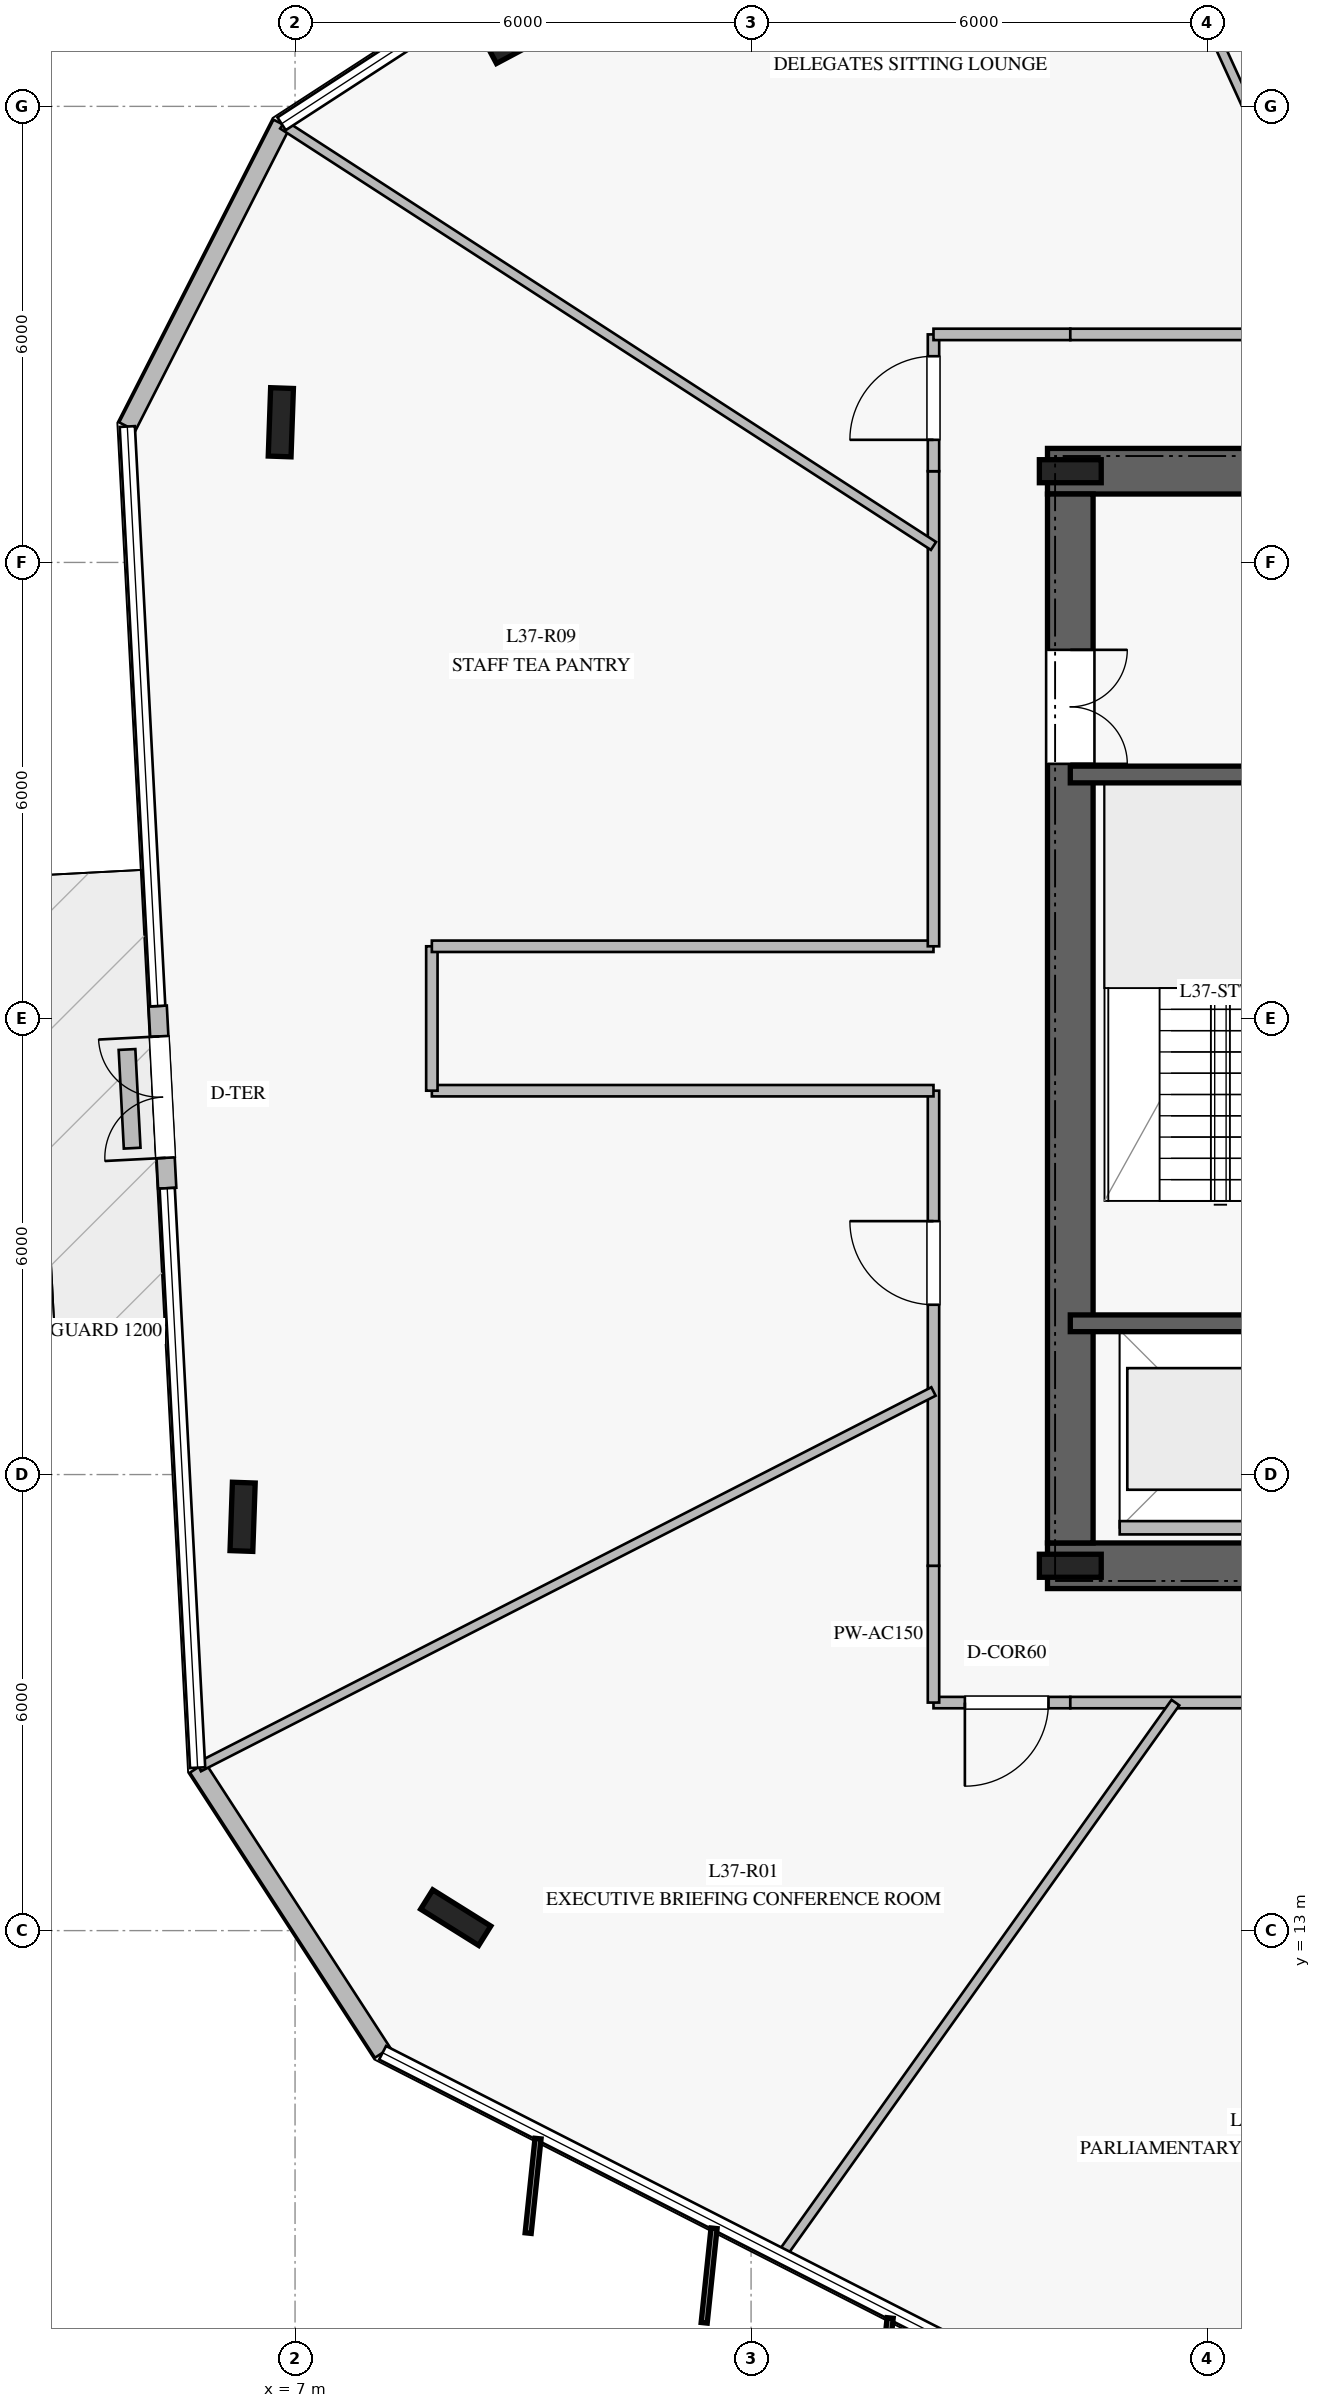
"""IFC4 building model, lengths in metres.
Left out: names, types, materials, properties, quantities, classifications, styles, units other than length and angle.
Written with IfcOpenShell. Run it as: python <this file> out.ifc"""

import sys

from ifc_helpers import new_model, si_unit, direction, frame, frame_2d, origin, origin_2d, place, context, subcontext, project, spatial, rectangle, i_section, extrude, element, fill, save


model = new_model("IFC4")
c1 = context("Model", 3, precision=1e-05, world=origin(), true_north=direction((0.0, 1.0)))
c2 = subcontext(c1, "Body", "Model", "MODEL_VIEW")
j1 = project(units=[si_unit("LENGTHUNIT", "METRE"), si_unit("PLANEANGLEUNIT", "RADIAN")], contexts=[c1])
p1 = place(None, origin())
s1 = spatial("IfcSite", under=j1, at=p1, CompositionType="ELEMENT")
p2 = place(p1, origin())
s2 = spatial("IfcBuilding", under=s1, at=p2, CompositionType="ELEMENT")
p3 = place(p2, frame((0.0, 0.0, 154.4)))
s3 = spatial("IfcBuildingStorey", under=s2, at=p3, CompositionType="ELEMENT", Elevation=154.4)
p4 = place(p3, frame((16.9, 17.8, 0.0), z_axis=(0.0, 0.0, 1.0), x_axis=(1.0, 0.0, 0.0)))
e1 = element("IfcWall", 1, at=p4, inside=s3, PredefinedType="SHEAR", context=c2, shape_type="SweptSolid", body=[
    extrude(rectangle(XDim=16.2, YDim=0.6, at=frame_2d((8.1, 0.0))), origin(), (0.0, 0.0, 1.0), 3.76),
])
p5 = place(p4, frame((5.05, 0.0, 0.0)))
e2 = element("IfcOpeningElement", 2, at=p5, cuts=e1, PredefinedType="OPENING", context=c2, shape_type="SweptSolid", body=[
    extrude(rectangle(XDim=1.2, YDim=2.25, at=frame_2d((0.6, 1.125))), frame((0.0, 0.31, 0.0), z_axis=(0.0, -1.0, 0.0), x_axis=(1.0, 0.0, 0.0)), (0.0, 0.0, 1.0), 0.62),
])
p6 = place(p4, frame((10.95, 0.0, 0.0)))
e3 = element("IfcOpeningElement", 3, at=p6, cuts=e1, PredefinedType="OPENING", context=c2, shape_type="SweptSolid", body=[
    extrude(rectangle(XDim=1.1, YDim=2.2, at=frame_2d((0.55, 1.1))), frame((0.0, 0.31, 0.0), z_axis=(0.0, -1.0, 0.0), x_axis=(1.0, 0.0, 0.0)), (0.0, 0.0, 1.0), 0.62),
])
p7 = place(p3, frame((33.1, 32.2, 0.0), z_axis=(0.0, 0.0, 1.0), x_axis=(-1.0, 0.0, 0.0)))
e4 = element("IfcWall", 4, at=p7, inside=s3, PredefinedType="SHEAR", context=c2, shape_type="SweptSolid", body=[
    extrude(rectangle(XDim=16.2, YDim=0.6, at=frame_2d((8.1, 0.0))), origin(), (0.0, 0.0, 1.0), 3.76),
])
p8 = place(p7, frame((5.05, 0.0, 0.0)))
e5 = element("IfcOpeningElement", 5, at=p8, cuts=e4, PredefinedType="OPENING", context=c2, shape_type="SweptSolid", body=[
    extrude(rectangle(XDim=1.2, YDim=2.25, at=frame_2d((0.6, 1.125))), frame((0.0, 0.31, 0.0), z_axis=(0.0, -1.0, 0.0), x_axis=(1.0, 0.0, 0.0)), (0.0, 0.0, 1.0), 0.62),
])
p9 = place(p7, frame((11.85, 0.0, 0.0)))
e6 = element("IfcOpeningElement", 6, at=p9, cuts=e4, PredefinedType="OPENING", context=c2, shape_type="SweptSolid", body=[
    extrude(rectangle(XDim=1.1, YDim=2.2, at=frame_2d((0.55, 1.1))), frame((0.0, 0.31, 0.0), z_axis=(0.0, -1.0, 0.0), x_axis=(1.0, 0.0, 0.0)), (0.0, 0.0, 1.0), 0.62),
])
p10 = place(p7, frame((9.875, 0.0, 0.0)))
e7 = element("IfcOpeningElement", 7, at=p10, cuts=e4, PredefinedType="OPENING", context=c2, shape_type="SweptSolid", body=[
    extrude(rectangle(XDim=1.1, YDim=2.2, at=frame_2d((0.55, 1.1))), frame((0.0, 0.31, 0.0), z_axis=(0.0, -1.0, 0.0), x_axis=(1.0, 0.0, 0.0)), (0.0, 0.0, 1.0), 0.62),
])
p11 = place(p7, frame((7.9, 0.0, 0.0)))
e8 = element("IfcOpeningElement", 8, at=p11, cuts=e4, PredefinedType="OPENING", context=c2, shape_type="SweptSolid", body=[
    extrude(rectangle(XDim=1.1, YDim=2.2, at=frame_2d((0.55, 1.1))), frame((0.0, 0.31, 0.0), z_axis=(0.0, -1.0, 0.0), x_axis=(1.0, 0.0, 0.0)), (0.0, 0.0, 1.0), 0.62),
])
p12 = place(p3, frame((17.2, 31.9, 0.0), z_axis=(0.0, 0.0, 1.0), x_axis=(0.0, -1.0, 0.0)))
e9 = element("IfcWall", 9, at=p12, inside=s3, PredefinedType="SHEAR", context=c2, shape_type="SweptSolid", body=[
    extrude(rectangle(XDim=13.8, YDim=0.6, at=frame_2d((6.9, 0.0))), origin(), (0.0, 0.0, 1.0), 3.76),
])
p13 = place(p12, frame((2.05, 0.0, 0.0)))
e10 = element("IfcOpeningElement", 10, at=p13, cuts=e9, PredefinedType="OPENING", context=c2, shape_type="SweptSolid", body=[
    extrude(rectangle(XDim=1.5, YDim=2.2, at=frame_2d((0.75, 1.1))), frame((0.0, 0.31, 0.0), z_axis=(0.0, -1.0, 0.0), x_axis=(1.0, 0.0, 0.0)), (0.0, 0.0, 1.0), 0.62),
])
for number, where, z_axis, x_axis in (
    (11, (17.2, 17.8, 0.0), (0.0, 0.0, 1.0), (1.0, 0.0, 0.0)),
    (12, (17.2, 32.2, 0.0), (0.0, 0.0, 1.0), (1.0, 0.0, 0.0)),
):
    element("IfcColumn", number, at=place(p3, frame(where, z_axis=z_axis, x_axis=x_axis)), inside=s3, PredefinedType="COLUMN", context=c2, shape_type="SweptSolid", body=[
        extrude(i_section(OverallWidth=0.303, OverallDepth=0.814, WebThickness=0.021, FlangeThickness=0.04, at=origin_2d()), origin(), (0.0, 0.0, 1.0), 4.0),
    ])
for number, where, z_axis, x_axis in (
    (13, (17.2, 20.99, 0.0), (0.0, 0.0, 1.0), (1.0, 0.0, 0.0)),
    (14, (17.2, 28.21, 0.0), (0.0, 0.0, 1.0), (1.0, 0.0, 0.0)),
):
    element("IfcWall", number, at=place(p3, frame(where, z_axis=z_axis, x_axis=x_axis)), inside=s3, PredefinedType="SOLIDWALL", context=c2, shape_type="SweptSolid", body=[
        extrude(rectangle(XDim=3.72, YDim=0.22, at=frame_2d((1.86, 0.0))), origin(), (0.0, 0.0, 1.0), 3.76),
    ])
for number, where, z_axis, x_axis in (
    (15, (9.977, 37.908, 0.0), (0.0, 0.0, 1.0), (0.883, 0.469, 0.0)),
    (16, (6.813, 32.844, 0.0), (0.0, 0.0, 1.0), (0.035, 0.999, 0.0)),
    (17, (6.31, 18.444, 0.0), (0.0, 0.0, 1.0), (0.035, 0.999, 0.0)),
    (18, (9.114, 13.171, 0.0), (0.0, 0.0, 1.0), (-0.848, 0.53, 0.0)),
):
    element("IfcColumn", number, at=place(p3, frame(where, z_axis=z_axis, x_axis=x_axis)), inside=s3, PredefinedType="COLUMN", context=c2, shape_type="SweptSolid", body=[
        extrude(i_section(OverallWidth=0.3, OverallDepth=0.9, WebThickness=0.019, FlangeThickness=0.035, at=origin_2d()), origin(), (0.0, 0.0, 1.0), 4.0),
    ])
p14 = place(p3, frame((6.823, 36.771, 0.0), z_axis=(0.0, 0.0, 1.0), x_axis=(-0.454103301767, -0.89094903969, 0.0)))
e19 = element("IfcWall", 19, at=p14, inside=s3, PredefinedType="STANDARD", context=c2, shape_type="SweptSolid", body=[
    extrude(rectangle(XDim=4.47, YDim=0.24, at=frame_2d((2.235, 0.0))), origin(), (0.0, 0.0, 1.0), 3.76),
])
p15 = place(p3, frame((5.193, 25.164, 0.0), z_axis=(0.0, 0.0, 1.0), x_axis=(0.052078347636, -0.998643002132, 0.0)))
e20 = element("IfcWall", 20, at=p15, inside=s3, PredefinedType="STANDARD", context=c2, shape_type="SweptSolid", body=[
    extrude(rectangle(XDim=2.4, YDim=0.24, at=frame_2d((1.2, 0.0))), origin(), (0.0, 0.0, 1.0), 3.76),
])
p16 = place(p15, frame((0.4, 0.0, 0.0)))
e21 = element("IfcOpeningElement", 21, at=p16, cuts=e20, PredefinedType="OPENING", context=c2, shape_type="SweptSolid", body=[
    extrude(rectangle(XDim=1.6, YDim=2.25, at=frame_2d((0.8, 1.125))), frame((0.0, 0.13, 0.0), z_axis=(0.0, -1.0, 0.0), x_axis=(1.0, 0.0, 0.0)), (0.0, 0.0, 1.0), 0.26),
])
p17 = place(p3, frame((5.718, 15.144, 0.0), z_axis=(0.0, 0.0, 1.0), x_axis=(0.544351046129, -0.838857519832, 0.0)))
e22 = element("IfcWall", 22, at=p17, inside=s3, PredefinedType="STANDARD", context=c2, shape_type="SweptSolid", body=[
    extrude(rectangle(XDim=4.471, YDim=0.24, at=frame_2d((2.236, 0.0))), origin(), (0.0, 0.0, 1.0), 3.76),
])
p18 = place(p3, frame((4.789, 24.592, 0.0), z_axis=(0.0, 0.0, 1.0), x_axis=(0.052213802573, -0.998635929066, 0.0)))
e23 = element("IfcWall", 23, at=p18, inside=s3, PredefinedType="USERDEFINED", context=c2, shape_type="SweptSolid", body=[
    extrude(rectangle(XDim=1.3, YDim=0.22, at=frame_2d((0.65, 0.0))), origin(), (0.0, 0.0, 1.0), 0.4),
])
p19 = place(p3, frame((17.85, 18.3, 0.0), z_axis=(0.0, 0.0, 1.0), x_axis=(1.0, 0.0, 0.0)))
e24 = element("IfcWall", 24, at=p19, inside=s3, PredefinedType="PARTITIONING", context=c2, shape_type="SweptSolid", body=[
    extrude(rectangle(XDim=2.6, YDim=0.175, at=frame_2d((1.3, 0.0))), origin(), (0.0, 0.0, 1.0), 3.76),
])
p20 = place(p3, frame((17.2, 16.0, 0.0), z_axis=(0.0, 0.0, 1.0), x_axis=(-1.0, 0.0, 0.0)))
e25 = element("IfcWall", 25, at=p20, inside=s3, PredefinedType="PARTITIONING", context=c2, shape_type="SweptSolid", body=[
    extrude(rectangle(XDim=1.8, YDim=0.15, at=frame_2d((0.9, 0.0))), origin(), (0.0, 0.0, 1.0), 3.36),
])
p21 = place(p20, frame((0.287, 0.0, 0.0)))
e26 = element("IfcOpeningElement", 26, at=p21, cuts=e25, PredefinedType="OPENING", context=c2, shape_type="SweptSolid", body=[
    extrude(rectangle(XDim=1.1, YDim=2.2, at=frame_2d((0.55, 1.1))), frame((0.0, 0.085, 0.0), z_axis=(0.0, -1.0, 0.0), x_axis=(1.0, 0.0, 0.0)), (0.0, 0.0, 1.0), 0.17),
])
p22 = place(p3, frame((15.4, 16.0, 0.0), z_axis=(0.0, 0.0, 1.0), x_axis=(0.0, 1.0, 0.0)))
e27 = element("IfcWall", 27, at=p22, inside=s3, PredefinedType="PARTITIONING", context=c2, shape_type="SweptSolid", body=[
    extrude(rectangle(XDim=1.8, YDim=0.15, at=frame_2d((0.9, 0.0))), origin(), (0.0, 0.0, 1.0), 3.21),
])
p23 = place(p3, frame((15.4, 17.8, 0.0), z_axis=(0.0, 0.0, 1.0), x_axis=(0.0, 1.0, 0.0)))
e28 = element("IfcWall", 28, at=p23, inside=s3, PredefinedType="PARTITIONING", context=c2, shape_type="SweptSolid", body=[
    extrude(rectangle(XDim=6.25, YDim=0.15, at=frame_2d((3.125, 0.0))), origin(), (0.0, 0.0, 1.0), 3.21),
])
p24 = place(p23, frame((3.434, 0.0, 0.0)))
e29 = element("IfcOpeningElement", 29, at=p24, cuts=e28, PredefinedType="OPENING", context=c2, shape_type="SweptSolid", body=[
    extrude(rectangle(XDim=1.1, YDim=2.2, at=frame_2d((0.55, 1.1))), frame((0.0, 0.085, 0.0), z_axis=(0.0, -1.0, 0.0), x_axis=(1.0, 0.0, 0.0)), (0.0, 0.0, 1.0), 0.17),
])
p25 = place(p3, frame((15.4, 24.05, 0.0), z_axis=(0.0, 0.0, 1.0), x_axis=(-1.0, 0.0, 0.0)))
e30 = element("IfcWall", 30, at=p25, inside=s3, PredefinedType="PARTITIONING", context=c2, shape_type="SweptSolid", body=[
    extrude(rectangle(XDim=6.6, YDim=0.15, at=frame_2d((3.3, 0.0))), origin(), (0.0, 0.0, 1.0), 3.02),
])
p26 = place(p3, frame((8.8, 24.05, 0.0), z_axis=(0.0, 0.0, 1.0), x_axis=(0.0, 1.0, 0.0)))
e31 = element("IfcWall", 31, at=p26, inside=s3, PredefinedType="PARTITIONING", context=c2, shape_type="SweptSolid", body=[
    extrude(rectangle(XDim=1.9, YDim=0.15, at=frame_2d((0.95, 0.0))), origin(), (0.0, 0.0, 1.0), 3.22),
])
p27 = place(p3, frame((8.8, 25.95, 0.0), z_axis=(0.0, 0.0, 1.0), x_axis=(1.0, 0.0, 0.0)))
e32 = element("IfcWall", 32, at=p27, inside=s3, PredefinedType="PARTITIONING", context=c2, shape_type="SweptSolid", body=[
    extrude(rectangle(XDim=6.6, YDim=0.15, at=frame_2d((3.3, 0.0))), origin(), (0.0, 0.0, 1.0), 3.02),
])
p28 = place(p3, frame((15.4, 25.95, 0.0), z_axis=(0.0, 0.0, 1.0), x_axis=(0.0, 1.0, 0.0)))
e33 = element("IfcWall", 33, at=p28, inside=s3, PredefinedType="PARTITIONING", context=c2, shape_type="SweptSolid", body=[
    extrude(rectangle(XDim=6.25, YDim=0.15, at=frame_2d((3.125, 0.0))), origin(), (0.0, 0.0, 1.0), 3.21),
])
p29 = place(p3, frame((15.4, 32.2, 0.0), z_axis=(0.0, 0.0, 1.0), x_axis=(0.0, 1.0, 0.0)))
e34 = element("IfcWall", 34, at=p29, inside=s3, PredefinedType="PARTITIONING", context=c2, shape_type="SweptSolid", body=[
    extrude(rectangle(XDim=1.8, YDim=0.15, at=frame_2d((0.9, 0.0))), origin(), (0.0, 0.0, 1.0), 3.21),
])
p30 = place(p29, frame((0.413, 0.0, 0.0)))
e35 = element("IfcOpeningElement", 35, at=p30, cuts=e34, PredefinedType="OPENING", context=c2, shape_type="SweptSolid", body=[
    extrude(rectangle(XDim=1.1, YDim=2.2, at=frame_2d((0.55, 1.1))), frame((0.0, 0.085, 0.0), z_axis=(0.0, -1.0, 0.0), x_axis=(1.0, 0.0, 0.0)), (0.0, 0.0, 1.0), 0.17),
])
p31 = place(p3, frame((15.4, 34.0, 0.0), z_axis=(0.0, 0.0, 1.0), x_axis=(1.0, 0.0, 0.0)))
e36 = element("IfcWall", 36, at=p31, inside=s3, PredefinedType="PARTITIONING", context=c2, shape_type="SweptSolid", body=[
    extrude(rectangle(XDim=1.8, YDim=0.15, at=frame_2d((0.9, 0.0))), origin(), (0.0, 0.0, 1.0), 3.76),
])
p32 = place(p3, frame((17.2, 34.0, 0.0), z_axis=(0.0, 0.0, 1.0), x_axis=(1.0, 0.0, 0.0)))
e37 = element("IfcWall", 37, at=p32, inside=s3, PredefinedType="PARTITIONING", context=c2, shape_type="SweptSolid", body=[
    extrude(rectangle(XDim=6.85, YDim=0.15, at=frame_2d((3.425, 0.0))), origin(), (0.0, 0.0, 1.0), 3.21),
])
p33 = place(p32, frame((4.525, 0.0, 0.0)))
e38 = element("IfcOpeningElement", 38, at=p33, cuts=e37, PredefinedType="OPENING", context=c2, shape_type="SweptSolid", body=[
    extrude(rectangle(XDim=1.1, YDim=2.2, at=frame_2d((0.55, 1.1))), frame((0.0, 0.085, 0.0), z_axis=(0.0, -1.0, 0.0), x_axis=(1.0, 0.0, 0.0)), (0.0, 0.0, 1.0), 0.17),
])
p34 = place(p3, frame((24.05, 16.0, 0.0), z_axis=(0.0, 0.0, 1.0), x_axis=(-1.0, 0.0, 0.0)))
e39 = element("IfcWall", 39, at=p34, inside=s3, PredefinedType="PARTITIONING", context=c2, shape_type="SweptSolid", body=[
    extrude(rectangle(XDim=6.85, YDim=0.15, at=frame_2d((3.425, 0.0))), origin(), (0.0, 0.0, 1.0), 3.21),
])
p35 = place(p3, frame((20.896, 34.0, 0.0), z_axis=(0.0, 0.0, 1.0), x_axis=(-0.414877179532, 0.90987742356, 0.0)))
e40 = element("IfcWall", 40, at=p35, inside=s3, PredefinedType="PARTITIONING", context=c2, shape_type="SweptSolid", body=[
    extrude(rectangle(XDim=10.083, YDim=0.125, at=frame_2d((5.042, 0.0))), origin(), (0.0, 0.0, 1.0), 3.05),
])
p36 = place(p3, frame((15.4, 31.217, 0.0), z_axis=(0.0, 0.0, 1.0), x_axis=(-0.839399301713, 0.543515236478, 0.0)))
e41 = element("IfcWall", 41, at=p36, inside=s3, PredefinedType="PARTITIONING", context=c2, shape_type="SweptSolid", body=[
    extrude(rectangle(XDim=10.2, YDim=0.125, at=frame_2d((5.1, 0.0))), origin(), (0.0, 0.0, 1.0), 3.16),
])
p37 = place(p3, frame((15.4, 20.093, 0.0), z_axis=(0.0, 0.0, 1.0), x_axis=(-0.890415643469, -0.45514830755, 0.0)))
e42 = element("IfcWall", 42, at=p37, inside=s3, PredefinedType="PARTITIONING", context=c2, shape_type="SweptSolid", body=[
    extrude(rectangle(XDim=10.856, YDim=0.125, at=frame_2d((5.428, 0.0))), origin(), (0.0, 0.0, 1.0), 3.16),
])
p38 = place(p3, frame((18.583, 16.0, 0.0), z_axis=(0.0, 0.0, 1.0), x_axis=(-0.580528659024, -0.814239814828, 0.0)))
e43 = element("IfcWall", 43, at=p38, inside=s3, PredefinedType="PARTITIONING", context=c2, shape_type="SweptSolid", body=[
    extrude(rectangle(XDim=8.921, YDim=0.125, at=frame_2d((4.46, 0.0))), origin(), (0.0, 0.0, 1.0), 3.16),
])
p39 = place(p16, frame((1.6, 0.0, 0.0), z_axis=(0.0, 0.0, 1.0), x_axis=(-1.0, 0.0, 0.0)))
e44 = element("IfcDoor", 44, at=p39, inside=s3, OperationType="DOUBLE_DOOR_SINGLE_SWING", PredefinedType="DOOR", context=c2, shape_type="SweptSolid", body=[
    extrude(rectangle(XDim=1.6, YDim=2.25, at=frame_2d((0.8, 1.125))), frame((0.0, 0.025, 0.0), z_axis=(0.0, -1.0, 0.0), x_axis=(1.0, 0.0, 0.0)), (0.0, 0.0, 1.0), 0.05),
])
fill(e21, e44)
p40 = place(p13, origin())
e45 = element("IfcDoor", 45, at=p40, inside=s3, OperationType="DOUBLE_DOOR_SINGLE_SWING", PredefinedType="DOOR", context=c2, shape_type="SweptSolid", body=[
    extrude(rectangle(XDim=1.5, YDim=2.2, at=frame_2d((0.75, 1.1))), frame((0.0, 0.025, 0.0), z_axis=(0.0, -1.0, 0.0), x_axis=(1.0, 0.0, 0.0)), (0.0, 0.0, 1.0), 0.05),
])
fill(e10, e45)
p41 = place(p21, origin())
e46 = element("IfcDoor", 46, at=p41, inside=s3, OperationType="SINGLE_SWING_RIGHT", PredefinedType="DOOR", context=c2, shape_type="SweptSolid", body=[
    extrude(rectangle(XDim=1.1, YDim=2.2, at=frame_2d((0.55, 1.1))), frame((0.0, 0.025, 0.0), z_axis=(0.0, -1.0, 0.0), x_axis=(1.0, 0.0, 0.0)), (0.0, 0.0, 1.0), 0.05),
])
fill(e26, e46)
p42 = place(p30, origin())
e47 = element("IfcDoor", 47, at=p42, inside=s3, OperationType="SINGLE_SWING_LEFT", PredefinedType="DOOR", context=c2, shape_type="SweptSolid", body=[
    extrude(rectangle(XDim=1.1, YDim=2.2, at=frame_2d((0.55, 1.1))), frame((0.0, 0.025, 0.0), z_axis=(0.0, -1.0, 0.0), x_axis=(1.0, 0.0, 0.0)), (0.0, 0.0, 1.0), 0.05),
])
fill(e35, e47)
p43 = place(p24, origin())
e48 = element("IfcDoor", 48, at=p43, inside=s3, OperationType="SINGLE_SWING_RIGHT", PredefinedType="DOOR", context=c2, shape_type="SweptSolid", body=[
    extrude(rectangle(XDim=1.1, YDim=2.2, at=frame_2d((0.55, 1.1))), frame((0.0, 0.025, 0.0), z_axis=(0.0, -1.0, 0.0), x_axis=(1.0, 0.0, 0.0)), (0.0, 0.0, 1.0), 0.05),
])
fill(e29, e48)
save(model, sys.argv[1])
